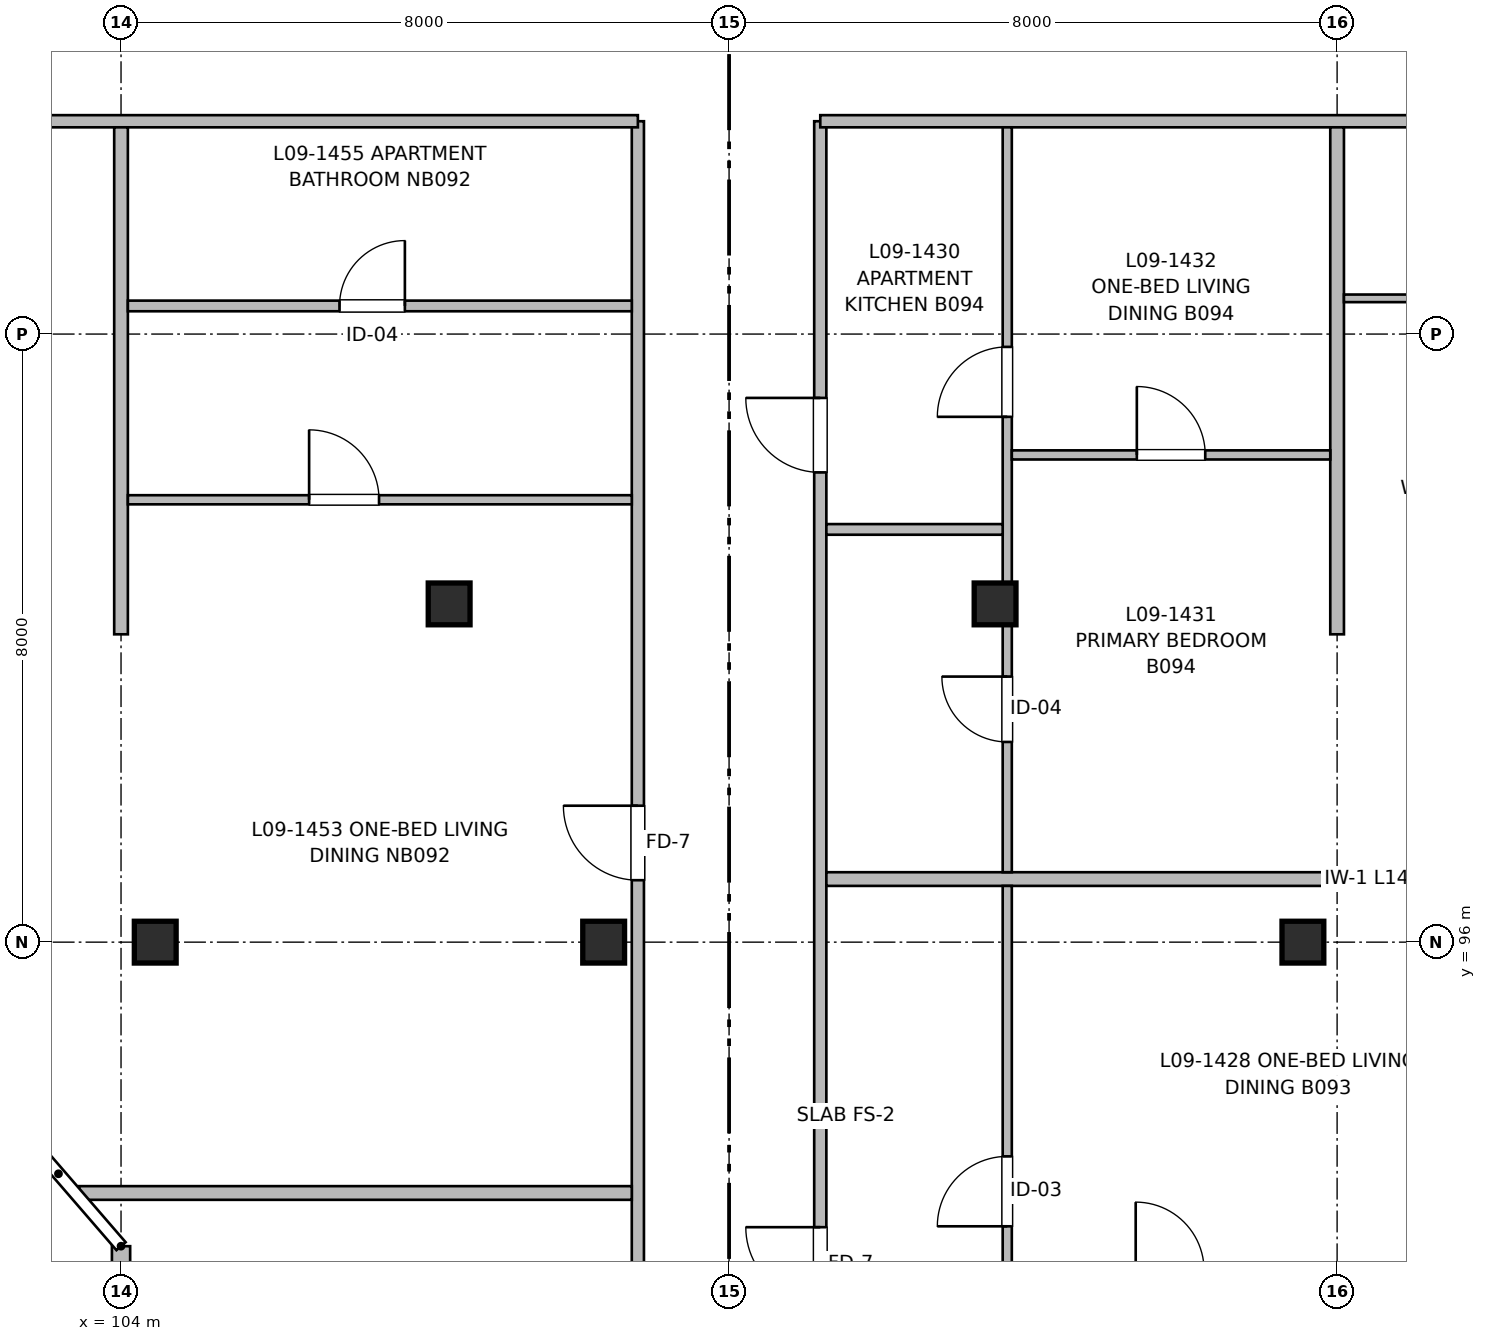
"""IFC4 building model, lengths in metres.
Left out: names, types, materials, properties, quantities, classifications, styles, units other than length and angle.
Written with IfcOpenShell. Run it as: python <this file> out.ifc"""

import sys

from ifc_helpers import new_model, si_unit, direction, frame, frame_2d, origin, origin_2d, place, context, subcontext, project, spatial, rectangle, extrude, element, fill, save


model = new_model("IFC4")
c1 = context("Model", 3, precision=1e-05, world=origin(), true_north=direction((0.0, 1.0)))
c2 = subcontext(c1, "Body", "Model", "MODEL_VIEW")
j1 = project(units=[si_unit("LENGTHUNIT", "METRE"), si_unit("PLANEANGLEUNIT", "RADIAN")], contexts=[c1])
p1 = place(None, origin())
s1 = spatial("IfcSite", under=j1, at=p1, CompositionType="ELEMENT")
p2 = place(p1, origin())
s2 = spatial("IfcBuilding", under=s1, at=p2, CompositionType="ELEMENT")
p3 = place(p2, frame((0.0, 0.0, 29.76)))
s3 = spatial("IfcBuildingStorey", under=s2, at=p3, CompositionType="ELEMENT", Elevation=29.76)
for number, where, z_axis, x_axis in (
    (1, (104.45, 96.0, 0.0), (0.0, 0.0, 1.0), (1.0, 0.0, 0.0)),
    (2, (108.317, 100.45, 0.0), (0.0, 0.0, 1.0), (1.0, 0.0, 0.0)),
    (3, (110.35, 96.0, 0.0), (0.0, 0.0, 1.0), (1.0, 0.0, 0.0)),
    (4, (115.5, 100.45, 0.0), (0.0, 0.0, 1.0), (1.0, 0.0, 0.0)),
    (5, (119.55, 96.0, 0.0), (0.0, 0.0, 1.0), (1.0, 0.0, 0.0)),
):
    element("IfcColumn", number, at=place(p3, frame(where, z_axis=z_axis, x_axis=x_axis)), inside=s3, PredefinedType="COLUMN", context=c2, shape_type="SweptSolid", body=[
        extrude(rectangle(XDim=0.55, YDim=0.55, at=origin_2d()), origin(), (0.0, 0.0, 1.0), 3.2),
    ])
p4 = place(p3, frame((104.0, 61.6, 0.0), z_axis=(0.0, 0.0, 1.0), x_axis=(0.0, 1.0, 0.0)))
e6 = element("IfcWall", 6, at=p4, inside=s3, PredefinedType="SOLIDWALL", context=c2, shape_type="SweptSolid", body=[
    extrude(rectangle(XDim=30.4, YDim=0.24, at=frame_2d((15.2, 0.0))), origin(), (0.0, 0.0, 1.0), 2.98),
])
p5 = place(p4, frame((3.467, 0.0, 0.82)))
e7 = element("IfcOpeningElement", 7, at=p5, cuts=e6, PredefinedType="OPENING", context=c2, shape_type="SweptSolid", body=[
    extrude(rectangle(XDim=1.5, YDim=1.4, at=frame_2d((0.75, 0.7))), frame((0.0, 0.13, 0.0), z_axis=(0.0, -1.0, 0.0), x_axis=(1.0, 0.0, 0.0)), (0.0, 0.0, 1.0), 0.26),
])
p6 = place(p4, frame((14.425, 0.0, 0.82)))
e8 = element("IfcOpeningElement", 8, at=p6, cuts=e6, PredefinedType="OPENING", context=c2, shape_type="SweptSolid", body=[
    extrude(rectangle(XDim=1.55, YDim=1.4, at=frame_2d((0.775, 0.7))), frame((0.0, 0.13, 0.0), z_axis=(0.0, -1.0, 0.0), x_axis=(1.0, 0.0, 0.0)), (0.0, 0.0, 1.0), 0.26),
])
p7 = place(p4, frame((24.333, 0.0, 0.0)))
e9 = element("IfcOpeningElement", 9, at=p7, cuts=e6, PredefinedType="OPENING", context=c2, shape_type="SweptSolid", body=[
    extrude(rectangle(XDim=1.2, YDim=2.2, at=frame_2d((0.6, 1.1))), frame((0.0, 0.13, 0.0), z_axis=(0.0, -1.0, 0.0), x_axis=(1.0, 0.0, 0.0)), (0.0, 0.0, 1.0), 0.26),
])
p8 = place(p4, frame((26.633, 0.0, 0.72)))
e10 = element("IfcOpeningElement", 10, at=p8, cuts=e6, PredefinedType="OPENING", context=c2, shape_type="SweptSolid", body=[
    extrude(rectangle(XDim=1.95, YDim=1.5, at=frame_2d((0.975, 0.75))), frame((0.0, 0.13, 0.0), z_axis=(0.0, -1.0, 0.0), x_axis=(1.0, 0.0, 0.0)), (0.0, 0.0, 1.0), 0.26),
])
p9 = place(p3, frame((110.8, 61.76, 0.0), z_axis=(0.0, 0.0, 1.0), x_axis=(0.0, 1.0, 0.0)))
e11 = element("IfcWall", 11, at=p9, inside=s3, PredefinedType="PARTITIONING", context=c2, shape_type="SweptSolid", body=[
    extrude(rectangle(XDim=45.04, YDim=0.16, at=frame_2d((22.52, 0.0))), origin(), (0.0, 0.0, 1.0), 2.935),
])
p10 = place(p9, frame((7.24, 0.0, 0.0)))
e12 = element("IfcOpeningElement", 12, at=p10, cuts=e11, PredefinedType="OPENING", context=c2, shape_type="SweptSolid", body=[
    extrude(rectangle(XDim=1.1, YDim=2.15, at=frame_2d((0.55, 1.075))), frame((0.0, 0.09, 0.0), z_axis=(0.0, -1.0, 0.0), x_axis=(1.0, 0.0, 0.0)), (0.0, 0.0, 1.0), 0.18),
])
p11 = place(p9, frame((13.64, 0.0, 0.0)))
e13 = element("IfcOpeningElement", 13, at=p11, cuts=e11, PredefinedType="OPENING", context=c2, shape_type="SweptSolid", body=[
    extrude(rectangle(XDim=1.6, YDim=2.15, at=frame_2d((0.8, 1.075))), frame((0.0, 0.09, 0.0), z_axis=(0.0, -1.0, 0.0), x_axis=(1.0, 0.0, 0.0)), (0.0, 0.0, 1.0), 0.18),
])
p12 = place(p9, frame((3.0, 0.0, 0.0)))
e14 = element("IfcOpeningElement", 14, at=p12, cuts=e11, PredefinedType="OPENING", context=c2, shape_type="SweptSolid", body=[
    extrude(rectangle(XDim=0.96, YDim=2.15, at=frame_2d((0.48, 1.075))), frame((0.0, 0.09, 0.0), z_axis=(0.0, -1.0, 0.0), x_axis=(1.0, 0.0, 0.0)), (0.0, 0.0, 1.0), 0.18),
])
p13 = place(p9, frame((27.245, 0.0, 0.0)))
e15 = element("IfcOpeningElement", 15, at=p13, cuts=e11, PredefinedType="OPENING", context=c2, shape_type="SweptSolid", body=[
    extrude(rectangle(XDim=0.98, YDim=2.15, at=frame_2d((0.49, 1.075))), frame((0.0, 0.09, 0.0), z_axis=(0.0, -1.0, 0.0), x_axis=(1.0, 0.0, 0.0)), (0.0, 0.0, 1.0), 0.18),
])
p14 = place(p9, frame((35.055, 0.0, 0.0)))
e16 = element("IfcOpeningElement", 16, at=p14, cuts=e11, PredefinedType="OPENING", context=c2, shape_type="SweptSolid", body=[
    extrude(rectangle(XDim=0.98, YDim=2.15, at=frame_2d((0.49, 1.075))), frame((0.0, 0.09, 0.0), z_axis=(0.0, -1.0, 0.0), x_axis=(1.0, 0.0, 0.0)), (0.0, 0.0, 1.0), 0.18),
])
p15 = place(p3, frame((113.2, 61.76, 0.0), z_axis=(0.0, 0.0, 1.0), x_axis=(0.0, 1.0, 0.0)))
e17 = element("IfcWall", 17, at=p15, inside=s3, PredefinedType="PARTITIONING", context=c2, shape_type="SweptSolid", body=[
    extrude(rectangle(XDim=45.04, YDim=0.16, at=frame_2d((22.52, 0.0))), origin(), (0.0, 0.0, 1.0), 2.935),
])
p16 = place(p15, frame((5.67, 0.0, 0.0)))
e18 = element("IfcOpeningElement", 18, at=p16, cuts=e17, PredefinedType="OPENING", context=c2, shape_type="SweptSolid", body=[
    extrude(rectangle(XDim=0.98, YDim=2.15, at=frame_2d((0.49, 1.075))), frame((0.0, 0.09, 0.0), z_axis=(0.0, -1.0, 0.0), x_axis=(1.0, 0.0, 0.0)), (0.0, 0.0, 1.0), 0.18),
])
p17 = place(p15, frame((17.34, 0.0, 0.0)))
e19 = element("IfcOpeningElement", 19, at=p17, cuts=e17, PredefinedType="OPENING", context=c2, shape_type="SweptSolid", body=[
    extrude(rectangle(XDim=1.02, YDim=2.15, at=frame_2d((0.51, 1.075))), frame((0.0, 0.09, 0.0), z_axis=(0.0, -1.0, 0.0), x_axis=(1.0, 0.0, 0.0)), (0.0, 0.0, 1.0), 0.18),
])
p18 = place(p15, frame((29.51, 0.0, 0.0)))
e20 = element("IfcOpeningElement", 20, at=p18, cuts=e17, PredefinedType="OPENING", context=c2, shape_type="SweptSolid", body=[
    extrude(rectangle(XDim=0.98, YDim=2.15, at=frame_2d((0.49, 1.075))), frame((0.0, 0.09, 0.0), z_axis=(0.0, -1.0, 0.0), x_axis=(1.0, 0.0, 0.0)), (0.0, 0.0, 1.0), 0.18),
])
p19 = place(p15, frame((40.42, 0.0, 0.0)))
e21 = element("IfcOpeningElement", 21, at=p19, cuts=e17, PredefinedType="OPENING", context=c2, shape_type="SweptSolid", body=[
    extrude(rectangle(XDim=0.98, YDim=2.15, at=frame_2d((0.49, 1.075))), frame((0.0, 0.09, 0.0), z_axis=(0.0, -1.0, 0.0), x_axis=(1.0, 0.0, 0.0)), (0.0, 0.0, 1.0), 0.18),
])
p20 = place(p3, frame((93.66, 106.8, 0.0), z_axis=(0.0, 0.0, 1.0), x_axis=(1.0, 0.0, 0.0)))
e22 = element("IfcWall", 22, at=p20, inside=s3, PredefinedType="PARTITIONING", context=c2, shape_type="SweptSolid", body=[
    extrude(rectangle(XDim=17.14, YDim=0.16, at=frame_2d((8.57, 0.0))), origin(), (0.0, 0.0, 1.0), 2.935),
])
p21 = place(p3, frame((113.2, 106.8, 0.0), z_axis=(0.0, 0.0, 1.0), x_axis=(1.0, 0.0, 0.0)))
e23 = element("IfcWall", 23, at=p21, inside=s3, PredefinedType="PARTITIONING", context=c2, shape_type="SweptSolid", body=[
    extrude(rectangle(XDim=24.14, YDim=0.16, at=frame_2d((12.07, 0.0))), origin(), (0.0, 0.0, 1.0), 2.935),
])
p22 = place(p21, frame((19.575, 0.0, 0.0)))
e24 = element("IfcOpeningElement", 24, at=p22, cuts=e23, PredefinedType="OPENING", context=c2, shape_type="SweptSolid", body=[
    extrude(rectangle(XDim=1.05, YDim=2.15, at=frame_2d((0.525, 1.075))), frame((0.0, 0.09, 0.0), z_axis=(0.0, -1.0, 0.0), x_axis=(1.0, 0.0, 0.0)), (0.0, 0.0, 1.0), 0.18),
])
p23 = place(p21, frame((8.995, 0.0, 0.0)))
e25 = element("IfcOpeningElement", 25, at=p23, cuts=e23, PredefinedType="OPENING", context=c2, shape_type="SweptSolid", body=[
    extrude(rectangle(XDim=0.98, YDim=2.15, at=frame_2d((0.49, 1.075))), frame((0.0, 0.09, 0.0), z_axis=(0.0, -1.0, 0.0), x_axis=(1.0, 0.0, 0.0)), (0.0, 0.0, 1.0), 0.18),
])
for number, where, z_axis, x_axis in (
    (26, (120.0, 100.05, 0.0), (0.0, 0.0, 1.0), (0.0, 1.0, 0.0)),
    (27, (104.0, 100.05, 0.0), (0.0, 0.0, 1.0), (0.0, 1.0, 0.0)),
):
    element("IfcWall", number, at=place(p3, frame(where, z_axis=z_axis, x_axis=x_axis)), inside=s3, PredefinedType="PARTITIONING", context=c2, shape_type="SweptSolid", body=[
        extrude(rectangle(XDim=6.67, YDim=0.18, at=frame_2d((3.335, 0.0))), origin(), (0.0, 0.0, 1.0), 2.935),
    ])
p24 = place(p3, frame((113.28, 96.83, 0.0), z_axis=(0.0, 0.0, 1.0), x_axis=(1.0, 0.0, 0.0)))
e28 = element("IfcWall", 28, at=p24, inside=s3, PredefinedType="PARTITIONING", context=c2, shape_type="SweptSolid", body=[
    extrude(rectangle(XDim=14.705, YDim=0.18, at=frame_2d((7.352, 0.0))), origin(), (0.0, 0.0, 1.0), 2.935),
])
p25 = place(p3, frame((115.66, 85.23, 0.0), z_axis=(0.0, 0.0, 1.0), x_axis=(0.0, 1.0, 0.0)))
e29 = element("IfcWall", 29, at=p25, inside=s3, PredefinedType="PARTITIONING", context=c2, shape_type="SweptSolid", body=[
    extrude(rectangle(XDim=11.51, YDim=0.12, at=frame_2d((5.755, 0.0))), origin(), (0.0, 0.0, 1.0), 2.935),
])
p26 = place(p25, frame((2.01, 0.0, 0.0)))
e30 = element("IfcOpeningElement", 30, at=p26, cuts=e29, PredefinedType="OPENING", context=c2, shape_type="SweptSolid", body=[
    extrude(rectangle(XDim=0.86, YDim=2.1, at=frame_2d((0.43, 1.05))), frame((0.0, 0.07, 0.0), z_axis=(0.0, -1.0, 0.0), x_axis=(1.0, 0.0, 0.0)), (0.0, 0.0, 1.0), 0.14),
])
p27 = place(p25, frame((7.031, 0.0, 0.0)))
e31 = element("IfcOpeningElement", 31, at=p27, cuts=e29, PredefinedType="OPENING", context=c2, shape_type="SweptSolid", body=[
    extrude(rectangle(XDim=0.92, YDim=2.1, at=frame_2d((0.46, 1.05))), frame((0.0, 0.07, 0.0), z_axis=(0.0, -1.0, 0.0), x_axis=(1.0, 0.0, 0.0)), (0.0, 0.0, 1.0), 0.14),
])
p28 = place(p3, frame((115.66, 96.92, 0.0), z_axis=(0.0, 0.0, 1.0), x_axis=(0.0, 1.0, 0.0)))
e32 = element("IfcWall", 32, at=p28, inside=s3, PredefinedType="PARTITIONING", context=c2, shape_type="SweptSolid", body=[
    extrude(rectangle(XDim=9.8, YDim=0.12, at=frame_2d((4.9, 0.0))), origin(), (0.0, 0.0, 1.0), 2.68),
])
p29 = place(p28, frame((1.714, 0.0, 0.0)))
e33 = element("IfcOpeningElement", 33, at=p29, cuts=e32, PredefinedType="OPENING", context=c2, shape_type="SweptSolid", body=[
    extrude(rectangle(XDim=0.86, YDim=2.1, at=frame_2d((0.43, 1.05))), frame((0.0, 0.07, 0.0), z_axis=(0.0, -1.0, 0.0), x_axis=(1.0, 0.0, 0.0)), (0.0, 0.0, 1.0), 0.14),
])
p30 = place(p28, frame((5.991, 0.0, 0.0)))
e34 = element("IfcOpeningElement", 34, at=p30, cuts=e32, PredefinedType="OPENING", context=c2, shape_type="SweptSolid", body=[
    extrude(rectangle(XDim=0.92, YDim=2.1, at=frame_2d((0.46, 1.05))), frame((0.0, 0.07, 0.0), z_axis=(0.0, -1.0, 0.0), x_axis=(1.0, 0.0, 0.0)), (0.0, 0.0, 1.0), 0.14),
])
p31 = place(p3, frame((113.28, 101.43, 0.0), z_axis=(0.0, 0.0, 1.0), x_axis=(1.0, 0.0, 0.0)))
e35 = element("IfcWall", 35, at=p31, inside=s3, PredefinedType="PARTITIONING", context=c2, shape_type="SweptSolid", body=[
    extrude(rectangle(XDim=2.32, YDim=0.14, at=frame_2d((1.16, 0.0))), origin(), (0.0, 0.0, 1.0), 2.935),
])
p32 = place(p3, frame((115.72, 102.41, 0.0), z_axis=(0.0, 0.0, 1.0), x_axis=(1.0, 0.0, 0.0)))
e36 = element("IfcWall", 36, at=p32, inside=s3, PredefinedType="PARTITIONING", context=c2, shape_type="SweptSolid", body=[
    extrude(rectangle(XDim=4.19, YDim=0.12, at=frame_2d((2.095, 0.0))), origin(), (0.0, 0.0, 1.0), 2.935),
])
p33 = place(p32, frame((1.645, 0.0, 0.0)))
e37 = element("IfcOpeningElement", 37, at=p33, cuts=e36, PredefinedType="OPENING", context=c2, shape_type="SweptSolid", body=[
    extrude(rectangle(XDim=0.9, YDim=2.1, at=frame_2d((0.45, 1.05))), frame((0.0, 0.07, 0.0), z_axis=(0.0, -1.0, 0.0), x_axis=(1.0, 0.0, 0.0)), (0.0, 0.0, 1.0), 0.14),
])
p34 = place(p3, frame((120.09, 104.47, 0.0), z_axis=(0.0, 0.0, 1.0), x_axis=(1.0, 0.0, 0.0)))
e38 = element("IfcWall", 38, at=p34, inside=s3, PredefinedType="PARTITIONING", context=c2, shape_type="SweptSolid", body=[
    extrude(rectangle(XDim=5.13, YDim=0.1, at=frame_2d((2.565, 0.0))), origin(), (0.0, 0.0, 1.0), 2.935),
])
p35 = place(p34, frame((2.18, 0.0, 0.0)))
e39 = element("IfcOpeningElement", 39, at=p35, cuts=e38, PredefinedType="OPENING", context=c2, shape_type="SweptSolid", body=[
    extrude(rectangle(XDim=0.92, YDim=2.1, at=frame_2d((0.46, 1.05))), frame((0.0, 0.06, 0.0), z_axis=(0.0, -1.0, 0.0), x_axis=(1.0, 0.0, 0.0)), (0.0, 0.0, 1.0), 0.12),
])
p36 = place(p3, frame((103.448, 92.7, 0.0), z_axis=(0.0, 0.0, 1.0), x_axis=(1.0, 0.0, 0.0)))
e40 = element("IfcWall", 40, at=p36, inside=s3, PredefinedType="PARTITIONING", context=c2, shape_type="SweptSolid", body=[
    extrude(rectangle(XDim=7.272, YDim=0.18, at=frame_2d((3.636, 0.0))), origin(), (0.0, 0.0, 1.0), 2.935),
])
p37 = place(p3, frame((104.09, 101.82, 0.0), z_axis=(0.0, 0.0, 1.0), x_axis=(1.0, 0.0, 0.0)))
e41 = element("IfcWall", 41, at=p37, inside=s3, PredefinedType="PARTITIONING", context=c2, shape_type="SweptSolid", body=[
    extrude(rectangle(XDim=6.63, YDim=0.12, at=frame_2d((3.315, 0.0))), origin(), (0.0, 0.0, 1.0), 2.935),
])
p38 = place(p37, frame((2.385, 0.0, 0.0)))
e42 = element("IfcOpeningElement", 42, at=p38, cuts=e41, PredefinedType="OPENING", context=c2, shape_type="SweptSolid", body=[
    extrude(rectangle(XDim=0.92, YDim=2.1, at=frame_2d((0.46, 1.05))), frame((0.0, 0.07, 0.0), z_axis=(0.0, -1.0, 0.0), x_axis=(1.0, 0.0, 0.0)), (0.0, 0.0, 1.0), 0.14),
])
p39 = place(p3, frame((104.09, 104.37, 0.0), z_axis=(0.0, 0.0, 1.0), x_axis=(1.0, 0.0, 0.0)))
e43 = element("IfcWall", 43, at=p39, inside=s3, PredefinedType="PARTITIONING", context=c2, shape_type="SweptSolid", body=[
    extrude(rectangle(XDim=6.63, YDim=0.14, at=frame_2d((3.315, 0.0))), origin(), (0.0, 0.0, 1.0), 2.935),
])
p40 = place(p39, frame((2.785, 0.0, 0.0)))
e44 = element("IfcOpeningElement", 44, at=p40, cuts=e43, PredefinedType="OPENING", context=c2, shape_type="SweptSolid", body=[
    extrude(rectangle(XDim=0.86, YDim=2.1, at=frame_2d((0.43, 1.05))), frame((0.0, 0.08, 0.0), z_axis=(0.0, -1.0, 0.0), x_axis=(1.0, 0.0, 0.0)), (0.0, 0.0, 1.0), 0.16),
])
p41 = place(p27, origin())
e45 = element("IfcDoor", 45, at=p41, inside=s3, OperationType="SINGLE_SWING_LEFT", PredefinedType="DOOR", context=c2, shape_type="SweptSolid", body=[
    extrude(rectangle(XDim=0.92, YDim=2.1, at=frame_2d((0.46, 1.05))), frame((0.0, 0.025, 0.0), z_axis=(0.0, -1.0, 0.0), x_axis=(1.0, 0.0, 0.0)), (0.0, 0.0, 1.0), 0.05),
])
fill(e31, e45)
p42 = place(p18, origin())
e46 = element("IfcDoor", 46, at=p42, inside=s3, OperationType="SINGLE_SWING_RIGHT", PredefinedType="DOOR", context=c2, shape_type="SweptSolid", body=[
    extrude(rectangle(XDim=0.98, YDim=2.15, at=frame_2d((0.49, 1.075))), frame((0.0, 0.025, 0.0), z_axis=(0.0, -1.0, 0.0), x_axis=(1.0, 0.0, 0.0)), (0.0, 0.0, 1.0), 0.05),
])
fill(e20, e46)
p43 = place(p29, origin())
e47 = element("IfcDoor", 47, at=p43, inside=s3, OperationType="SINGLE_SWING_RIGHT", PredefinedType="DOOR", context=c2, shape_type="SweptSolid", body=[
    extrude(rectangle(XDim=0.86, YDim=2.1, at=frame_2d((0.43, 1.05))), frame((0.0, 0.025, 0.0), z_axis=(0.0, -1.0, 0.0), x_axis=(1.0, 0.0, 0.0)), (0.0, 0.0, 1.0), 0.05),
])
fill(e33, e47)
p44 = place(p30, origin())
e48 = element("IfcDoor", 48, at=p44, inside=s3, OperationType="SINGLE_SWING_LEFT", PredefinedType="DOOR", context=c2, shape_type="SweptSolid", body=[
    extrude(rectangle(XDim=0.92, YDim=2.1, at=frame_2d((0.46, 1.05))), frame((0.0, 0.025, 0.0), z_axis=(0.0, -1.0, 0.0), x_axis=(1.0, 0.0, 0.0)), (0.0, 0.0, 1.0), 0.05),
])
fill(e34, e48)
p45 = place(p19, origin())
e49 = element("IfcDoor", 49, at=p45, inside=s3, OperationType="SINGLE_SWING_RIGHT", PredefinedType="DOOR", context=c2, shape_type="SweptSolid", body=[
    extrude(rectangle(XDim=0.98, YDim=2.15, at=frame_2d((0.49, 1.075))), frame((0.0, 0.025, 0.0), z_axis=(0.0, -1.0, 0.0), x_axis=(1.0, 0.0, 0.0)), (0.0, 0.0, 1.0), 0.05),
])
fill(e21, e49)
p46 = place(p33, origin())
e50 = element("IfcDoor", 50, at=p46, inside=s3, OperationType="SINGLE_SWING_LEFT", PredefinedType="DOOR", context=c2, shape_type="SweptSolid", body=[
    extrude(rectangle(XDim=0.9, YDim=2.1, at=frame_2d((0.45, 1.05))), frame((0.0, 0.025, 0.0), z_axis=(0.0, -1.0, 0.0), x_axis=(1.0, 0.0, 0.0)), (0.0, 0.0, 1.0), 0.05),
])
fill(e37, e50)
p47 = place(p40, origin())
e51 = element("IfcDoor", 51, at=p47, inside=s3, OperationType="SINGLE_SWING_RIGHT", PredefinedType="DOOR", context=c2, shape_type="SweptSolid", body=[
    extrude(rectangle(XDim=0.86, YDim=2.1, at=frame_2d((0.43, 1.05))), frame((0.0, 0.025, 0.0), z_axis=(0.0, -1.0, 0.0), x_axis=(1.0, 0.0, 0.0)), (0.0, 0.0, 1.0), 0.05),
])
fill(e44, e51)
p48 = place(p38, origin())
e52 = element("IfcDoor", 52, at=p48, inside=s3, OperationType="SINGLE_SWING_LEFT", PredefinedType="DOOR", context=c2, shape_type="SweptSolid", body=[
    extrude(rectangle(XDim=0.92, YDim=2.1, at=frame_2d((0.46, 1.05))), frame((0.0, 0.025, 0.0), z_axis=(0.0, -1.0, 0.0), x_axis=(1.0, 0.0, 0.0)), (0.0, 0.0, 1.0), 0.05),
])
fill(e42, e52)
p49 = place(p14, origin())
e53 = element("IfcDoor", 53, at=p49, inside=s3, OperationType="SINGLE_SWING_RIGHT", PredefinedType="DOOR", context=c2, shape_type="SweptSolid", body=[
    extrude(rectangle(XDim=0.98, YDim=2.15, at=frame_2d((0.49, 1.075))), frame((0.0, 0.025, 0.0), z_axis=(0.0, -1.0, 0.0), x_axis=(1.0, 0.0, 0.0)), (0.0, 0.0, 1.0), 0.05),
])
fill(e16, e53)
save(model, sys.argv[1])
